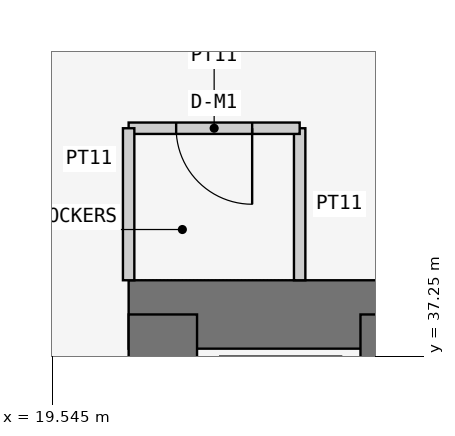
"""IFC4 building model, lengths in metres.
Left out: names, types, materials, properties, quantities, classifications, styles, units other than length and angle.
Written with IfcOpenShell. Run it as: python <this file> out.ifc"""

import sys

from ifc_helpers import new_model, si_unit, direction, frame, frame_2d, origin, place, context, subcontext, project, spatial, rectangle, extrude, element, fill, save


model = new_model("IFC4")
c1 = context("Model", 3, precision=1e-05, world=origin(), true_north=direction((0.0, 1.0)))
c2 = subcontext(c1, "Body", "Model", "MODEL_VIEW")
j1 = project(units=[si_unit("LENGTHUNIT", "METRE"), si_unit("PLANEANGLEUNIT", "RADIAN")], contexts=[c1])
p1 = place(None, origin())
s1 = spatial("IfcSite", under=j1, at=p1, CompositionType="ELEMENT")
p2 = place(p1, origin())
s2 = spatial("IfcBuilding", under=s1, at=p2, CompositionType="ELEMENT")
p3 = place(p2, frame((0.0, 0.0, 173.7)))
s3 = spatial("IfcBuildingStorey", under=s2, at=p3, CompositionType="ELEMENT", Elevation=173.7)
p4 = place(p3, frame((37.8, 37.8, 0.0), z_axis=(0.0, 0.0, 1.0), x_axis=(-1.0, 0.0, 0.0)))
e1 = element("IfcWall", 1, at=p4, inside=s3, PredefinedType="SHEAR", context=c2, shape_type="SweptSolid", body=[
    extrude(rectangle(XDim=17.25, YDim=0.9, at=frame_2d((8.625, 0.0))), origin(), (0.0, 0.0, 1.0), 3.6),
])
p5 = place(p3, frame((21.0, 37.8, 0.0), z_axis=(0.0, 0.0, 1.0), x_axis=(0.0, -1.0, 0.0)))
e2 = element("IfcWall", 2, at=p5, inside=s3, PredefinedType="SHEAR", context=c2, shape_type="SweptSolid", body=[
    extrude(rectangle(XDim=17.25, YDim=0.9, at=frame_2d((8.625, 0.0))), origin(), (0.0, 0.0, 1.0), 3.6),
])
p6 = place(p5, frame((5.4, 0.0, 0.0)))
e3 = element("IfcOpeningElement", 3, at=p6, cuts=e2, PredefinedType="OPENING", context=c2, shape_type="SweptSolid", body=[
    extrude(rectangle(XDim=1.2, YDim=2.1, at=frame_2d((0.6, 1.05))), frame((0.0, 0.46, 0.0), z_axis=(0.0, -1.0, 0.0), x_axis=(1.0, 0.0, 0.0)), (0.0, 0.0, 1.0), 0.92),
])
p7 = place(p3, frame((23.8, 34.6, 0.0), z_axis=(0.0, 0.0, 1.0), x_axis=(0.0, 1.0, 0.0)))
e4 = element("IfcWall", 4, at=p7, inside=s3, PredefinedType="SHEAR", context=c2, shape_type="SweptSolid", body=[
    extrude(rectangle(XDim=3.2, YDim=0.4, at=frame_2d((1.6, 0.0))), origin(), (0.0, 0.0, 1.0), 3.6),
])
p8 = place(p3, frame((22.8, 38.25, 0.0), z_axis=(0.0, 0.0, 1.0), x_axis=(0.0, 1.0, 0.0)))
e5 = element("IfcWall", 5, at=p8, inside=s3, PredefinedType="PARTITIONING", context=c2, shape_type="SweptSolid", body=[
    extrude(rectangle(XDim=2.0, YDim=0.15, at=frame_2d((1.0, 0.0))), origin(), (0.0, 0.0, 1.0), 3.35),
])
p9 = place(p3, frame((22.8, 40.25, 0.0), z_axis=(0.0, 0.0, 1.0), x_axis=(-1.0, 0.0, 0.0)))
e6 = element("IfcWall", 6, at=p9, inside=s3, PredefinedType="PARTITIONING", context=c2, shape_type="SweptSolid", body=[
    extrude(rectangle(XDim=2.25, YDim=0.15, at=frame_2d((1.125, 0.0))), origin(), (0.0, 0.0, 1.0), 3.35),
])
p10 = place(p9, frame((0.625, 0.0, 0.0)))
e7 = element("IfcOpeningElement", 7, at=p10, cuts=e6, PredefinedType="OPENING", context=c2, shape_type="SweptSolid", body=[
    extrude(rectangle(XDim=1.0, YDim=2.1, at=frame_2d((0.5, 1.05))), frame((0.0, 0.085, 0.0), z_axis=(0.0, -1.0, 0.0), x_axis=(1.0, 0.0, 0.0)), (0.0, 0.0, 1.0), 0.17),
])
p11 = place(p3, frame((20.55, 40.25, 0.0), z_axis=(0.0, 0.0, 1.0), x_axis=(0.0, -1.0, 0.0)))
e8 = element("IfcWall", 8, at=p11, inside=s3, PredefinedType="PARTITIONING", context=c2, shape_type="SweptSolid", body=[
    extrude(rectangle(XDim=2.0, YDim=0.15, at=frame_2d((1.0, 0.0))), origin(), (0.0, 0.0, 1.0), 3.35),
])
p12 = place(p10, origin())
e9 = element("IfcDoor", 9, at=p12, inside=s3, OperationType="SINGLE_SWING_LEFT", PredefinedType="DOOR", context=c2, shape_type="SweptSolid", body=[
    extrude(rectangle(XDim=1.0, YDim=2.1, at=frame_2d((0.5, 1.05))), frame((0.0, 0.025, 0.0), z_axis=(0.0, -1.0, 0.0), x_axis=(1.0, 0.0, 0.0)), (0.0, 0.0, 1.0), 0.05),
])
fill(e7, e9)
save(model, sys.argv[1])
